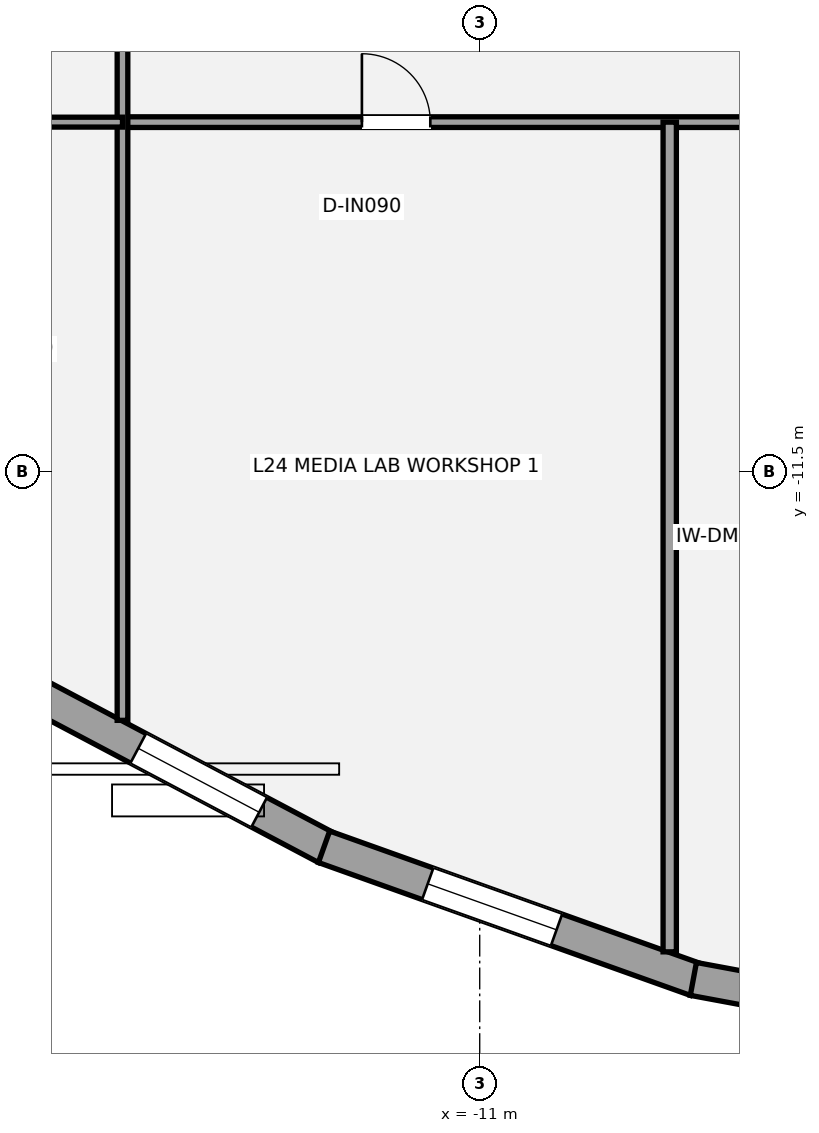
"""IFC4 building model, lengths in metres.
Left out: names, types, materials, properties, quantities, classifications, styles, units other than length and angle.
Written with IfcOpenShell. Run it as: python <this file> out.ifc"""

import sys

from ifc_helpers import new_model, si_unit, direction, frame, frame_2d, origin, place, context, subcontext, project, spatial, rectangle, extrude, element, fill, save


model = new_model("IFC4")
c1 = context("Model", 3, precision=1e-05, world=origin(), true_north=direction((0.0, 1.0)))
c2 = subcontext(c1, "Body", "Model", "MODEL_VIEW")
j1 = project(units=[si_unit("LENGTHUNIT", "METRE"), si_unit("PLANEANGLEUNIT", "RADIAN")], contexts=[c1])
p1 = place(None, origin())
s1 = spatial("IfcSite", under=j1, at=p1, CompositionType="ELEMENT")
p2 = place(p1, origin())
s2 = spatial("IfcBuilding", under=s1, at=p2, CompositionType="ELEMENT")
p3 = place(p2, frame((0.0, 0.0, 93.1)))
s3 = spatial("IfcBuildingStorey", under=s2, at=p3, CompositionType="ELEMENT", Elevation=93.1)
p4 = place(p3, frame((-13.019, -16.446, 0.0), z_axis=(0.0, 0.0, 1.0), x_axis=(-0.88395333318, 0.467575132743, 0.0)))
e1 = element("IfcWall", 1, at=p4, inside=s3, PredefinedType="STANDARD", context=c2, shape_type="SweptSolid", body=[
    extrude(rectangle(XDim=4.845, YDim=0.44, at=frame_2d((2.422, 0.0))), origin(), (0.0, 0.0, 1.0), 2.528),
])
p5 = place(p4, frame((0.998, 0.0, 0.65)))
e2 = element("IfcOpeningElement", 2, at=p5, cuts=e1, PredefinedType="OPENING", context=c2, shape_type="SweptSolid", body=[
    extrude(rectangle(XDim=1.8, YDim=1.7, at=frame_2d((0.9, 0.85))), frame((0.0, 0.23, 0.0), z_axis=(0.0, -1.0, 0.0), x_axis=(1.0, 0.0, 0.0)), (0.0, 0.0, 1.0), 0.46),
])
p6 = place(p3, frame((-8.155, -18.181, 0.0), z_axis=(0.0, 0.0, 1.0), x_axis=(-0.941734469447, 0.336357234285, 0.0)))
e3 = element("IfcWall", 3, at=p6, inside=s3, PredefinedType="STANDARD", context=c2, shape_type="SweptSolid", body=[
    extrude(rectangle(XDim=5.196, YDim=0.44, at=frame_2d((2.598, 0.0))), origin(), (0.0, 0.0, 1.0), 2.528),
])
p7 = place(p6, frame((1.948, 0.0, 0.65)))
e4 = element("IfcOpeningElement", 4, at=p7, cuts=e3, PredefinedType="OPENING", context=c2, shape_type="SweptSolid", body=[
    extrude(rectangle(XDim=1.8, YDim=1.7, at=frame_2d((0.9, 0.85))), frame((0.0, 0.23, 0.0), z_axis=(0.0, -1.0, 0.0), x_axis=(1.0, 0.0, 0.0)), (0.0, 0.0, 1.0), 0.46),
])
p8 = place(p3, frame((-2.778, -19.177, 0.0), z_axis=(0.0, 0.0, 1.0), x_axis=(-0.983175651308, 0.182662636232, 0.0)))
e5 = element("IfcWall", 5, at=p8, inside=s3, PredefinedType="STANDARD", context=c2, shape_type="SweptSolid", body=[
    extrude(rectangle(XDim=5.504, YDim=0.44, at=frame_2d((2.752, 0.0))), origin(), (0.0, 0.0, 1.0), 2.528),
])
p9 = place(p8, frame((1.63, 0.0, 0.65)))
e6 = element("IfcOpeningElement", 6, at=p9, cuts=e5, PredefinedType="OPENING", context=c2, shape_type="SweptSolid", body=[
    extrude(rectangle(XDim=1.8, YDim=1.7, at=frame_2d((0.9, 0.85))), frame((0.0, 0.23, 0.0), z_axis=(0.0, -1.0, 0.0), x_axis=(1.0, 0.0, 0.0)), (0.0, 0.0, 1.0), 0.46),
])
p10 = place(p3, frame((-15.7, -6.9, 0.0), z_axis=(0.0, 0.0, 1.0), x_axis=(1.0, 0.0, 0.0)))
e7 = element("IfcWall", 7, at=p10, inside=s3, PredefinedType="PARTITIONING", context=c2, shape_type="SweptSolid", body=[
    extrude(rectangle(XDim=33.2, YDim=0.14, at=frame_2d((16.6, 0.0))), origin(), (0.0, 0.0, 1.0), 2.688),
])
p11 = place(p10, frame((3.15, 0.0, 0.0)))
e8 = element("IfcOpeningElement", 8, at=p11, cuts=e7, PredefinedType="OPENING", context=c2, shape_type="SweptSolid", body=[
    extrude(rectangle(XDim=0.9, YDim=2.1, at=frame_2d((0.45, 1.05))), frame((0.0, 0.08, 0.0), z_axis=(0.0, -1.0, 0.0), x_axis=(1.0, 0.0, 0.0)), (0.0, 0.0, 1.0), 0.16),
])
p12 = place(p10, frame((11.0, 0.0, 0.0)))
e9 = element("IfcOpeningElement", 9, at=p12, cuts=e7, PredefinedType="OPENING", context=c2, shape_type="SweptSolid", body=[
    extrude(rectangle(XDim=0.9, YDim=2.1, at=frame_2d((0.45, 1.05))), frame((0.0, 0.08, 0.0), z_axis=(0.0, -1.0, 0.0), x_axis=(1.0, 0.0, 0.0)), (0.0, 0.0, 1.0), 0.16),
])
p13 = place(p10, frame((19.5, 0.0, 0.0)))
e10 = element("IfcOpeningElement", 10, at=p13, cuts=e7, PredefinedType="OPENING", context=c2, shape_type="SweptSolid", body=[
    extrude(rectangle(XDim=0.9, YDim=2.1, at=frame_2d((0.45, 1.05))), frame((0.0, 0.08, 0.0), z_axis=(0.0, -1.0, 0.0), x_axis=(1.0, 0.0, 0.0)), (0.0, 0.0, 1.0), 0.16),
])
p14 = place(p10, frame((27.95, 0.0, 0.0)))
e11 = element("IfcOpeningElement", 11, at=p14, cuts=e7, PredefinedType="OPENING", context=c2, shape_type="SweptSolid", body=[
    extrude(rectangle(XDim=1.5, YDim=2.15, at=frame_2d((0.75, 1.075))), frame((0.0, 0.08, 0.0), z_axis=(0.0, -1.0, 0.0), x_axis=(1.0, 0.0, 0.0)), (0.0, 0.0, 1.0), 0.16),
])
p15 = place(p3, frame((-15.7, -14.77, 0.0), z_axis=(0.0, 0.0, 1.0), x_axis=(0.0, 1.0, 0.0)))
e12 = element("IfcWall", 12, at=p15, inside=s3, PredefinedType="PARTITIONING", context=c2, shape_type="SweptSolid", body=[
    extrude(rectangle(XDim=22.32, YDim=0.14, at=frame_2d((11.16, 0.0))), origin(), (0.0, 0.0, 1.0), 2.751),
])
p16 = place(p15, frame((9.87, 0.0, 0.0)))
e13 = element("IfcOpeningElement", 13, at=p16, cuts=e12, PredefinedType="OPENING", context=c2, shape_type="SweptSolid", body=[
    extrude(rectangle(XDim=0.9, YDim=2.1, at=frame_2d((0.45, 1.05))), frame((0.0, 0.08, 0.0), z_axis=(0.0, -1.0, 0.0), x_axis=(1.0, 0.0, 0.0)), (0.0, 0.0, 1.0), 0.16),
])
p17 = place(p15, frame((14.22, 0.0, 0.0)))
e14 = element("IfcOpeningElement", 14, at=p17, cuts=e12, PredefinedType="OPENING", context=c2, shape_type="SweptSolid", body=[
    extrude(rectangle(XDim=0.9, YDim=2.1, at=frame_2d((0.45, 1.05))), frame((0.0, 0.08, 0.0), z_axis=(0.0, -1.0, 0.0), x_axis=(1.0, 0.0, 0.0)), (0.0, 0.0, 1.0), 0.16),
])
p18 = place(p15, frame((17.72, 0.0, 0.0)))
e15 = element("IfcOpeningElement", 15, at=p18, cuts=e12, PredefinedType="OPENING", context=c2, shape_type="SweptSolid", body=[
    extrude(rectangle(XDim=0.9, YDim=2.1, at=frame_2d((0.45, 1.05))), frame((0.0, 0.08, 0.0), z_axis=(0.0, -1.0, 0.0), x_axis=(1.0, 0.0, 0.0)), (0.0, 0.0, 1.0), 0.16),
])
p19 = place(p15, frame((20.595, 0.0, 0.0)))
e16 = element("IfcOpeningElement", 16, at=p19, cuts=e12, PredefinedType="OPENING", context=c2, shape_type="SweptSolid", body=[
    extrude(rectangle(XDim=0.9, YDim=2.1, at=frame_2d((0.45, 1.05))), frame((0.0, 0.08, 0.0), z_axis=(0.0, -1.0, 0.0), x_axis=(1.0, 0.0, 0.0)), (0.0, 0.0, 1.0), 0.16),
])
p20 = place(p3, frame((-8.5, -17.816, 0.0), z_axis=(0.0, 0.0, 1.0), x_axis=(0.0, 1.0, 0.0)))
e17 = element("IfcWall", 17, at=p20, inside=s3, PredefinedType="PARTITIONING", context=c2, shape_type="SweptSolid", body=[
    extrude(rectangle(XDim=10.916, YDim=0.175, at=frame_2d((5.458, 0.0))), origin(), (0.0, 0.0, 1.0), 2.763),
])
p21 = place(p3, frame((-25.533, -6.9, 0.0), z_axis=(0.0, 0.0, 1.0), x_axis=(1.0, 0.0, 0.0)))
e18 = element("IfcWall", 18, at=p21, inside=s3, PredefinedType="PARTITIONING", context=c2, shape_type="SweptSolid", body=[
    extrude(rectangle(XDim=9.833, YDim=0.13, at=frame_2d((4.917, 0.0))), origin(), (0.0, 0.0, 1.0), 2.688),
])
p22 = place(p21, frame((1.35, 0.0, 0.0)))
e19 = element("IfcOpeningElement", 19, at=p22, cuts=e18, PredefinedType="OPENING", context=c2, shape_type="SweptSolid", body=[
    extrude(rectangle(XDim=0.9, YDim=2.1, at=frame_2d((0.45, 1.05))), frame((0.0, 0.075, 0.0), z_axis=(0.0, -1.0, 0.0), x_axis=(1.0, 0.0, 0.0)), (0.0, 0.0, 1.0), 0.15),
])
p23 = place(p5, origin())
e20 = element("IfcWindow", 20, at=p23, inside=s3, PartitioningType="SINGLE_PANEL", PredefinedType="WINDOW", context=c2, shape_type="SweptSolid", body=[
    extrude(rectangle(XDim=1.8, YDim=1.7, at=frame_2d((0.9, 0.85))), frame((0.0, -0.01, 0.0), z_axis=(0.0, -1.0, 0.0), x_axis=(1.0, 0.0, 0.0)), (0.0, 0.0, 1.0), 0.06),
])
fill(e2, e20)
p24 = place(p7, origin())
e21 = element("IfcWindow", 21, at=p24, inside=s3, PartitioningType="SINGLE_PANEL", PredefinedType="WINDOW", context=c2, shape_type="SweptSolid", body=[
    extrude(rectangle(XDim=1.8, YDim=1.7, at=frame_2d((0.9, 0.85))), frame((0.0, -0.01, 0.0), z_axis=(0.0, -1.0, 0.0), x_axis=(1.0, 0.0, 0.0)), (0.0, 0.0, 1.0), 0.06),
])
fill(e4, e21)
p25 = place(p11, origin())
e22 = element("IfcDoor", 22, at=p25, inside=s3, OperationType="SINGLE_SWING_LEFT", PredefinedType="DOOR", context=c2, shape_type="SweptSolid", body=[
    extrude(rectangle(XDim=0.9, YDim=2.1, at=frame_2d((0.45, 1.05))), frame((0.0, 0.025, 0.0), z_axis=(0.0, -1.0, 0.0), x_axis=(1.0, 0.0, 0.0)), (0.0, 0.0, 1.0), 0.05),
])
fill(e8, e22)
save(model, sys.argv[1])
